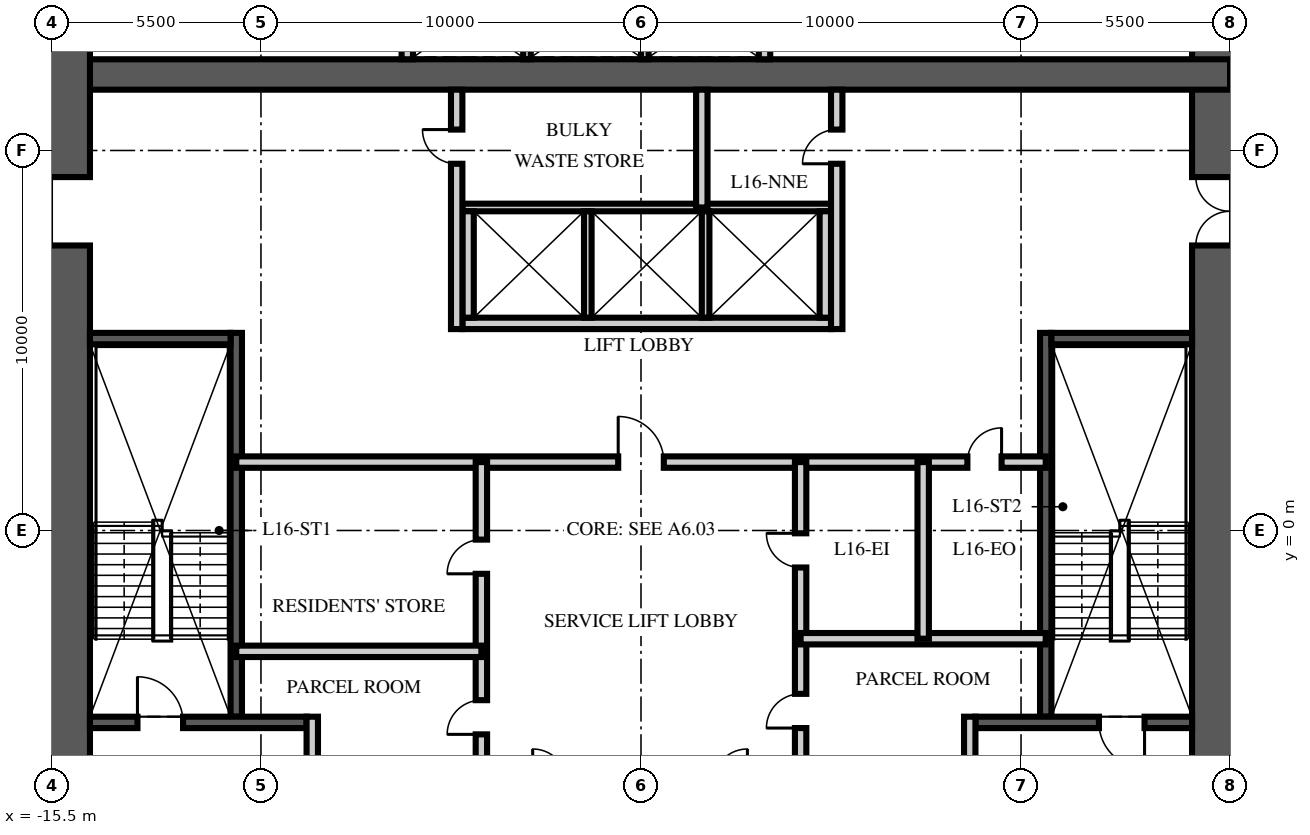
"""IFC4 building model, lengths in metres.
Left out: names, types, materials, properties, quantities, classifications, styles, units other than length and angle.
Written with IfcOpenShell. Run it as: python <this file> out.ifc"""

import sys

from ifc_helpers import new_model, si_unit, direction, frame, frame_2d, origin, place, context, subcontext, project, spatial, rectangle, extrude, element, fill, save


model = new_model("IFC4")
c1 = context("Model", 3, precision=1e-05, world=origin(), true_north=direction((0.0, 1.0)))
c2 = subcontext(c1, "Body", "Model", "MODEL_VIEW")
j1 = project(units=[si_unit("LENGTHUNIT", "METRE"), si_unit("PLANEANGLEUNIT", "RADIAN")], contexts=[c1])
p1 = place(None, origin())
s1 = spatial("IfcSite", under=j1, at=p1, CompositionType="ELEMENT")
p2 = place(p1, origin())
s2 = spatial("IfcBuilding", under=s1, at=p2, CompositionType="ELEMENT")
p3 = place(p2, frame((0.0, 0.0, 66.0)))
s3 = spatial("IfcBuildingStorey", under=s2, at=p3, CompositionType="ELEMENT", Elevation=66.0)
p4 = place(p3, frame((15.5, -15.5, -0.25), z_axis=(0.0, 0.0, 1.0), x_axis=(0.0, 1.0, 0.0)))
e1 = element("IfcWall", 1, at=p4, inside=s3, PredefinedType="SHEAR", context=c2, shape_type="SweptSolid", body=[
    extrude(rectangle(XDim=31.0, YDim=2.0, at=frame_2d((15.5, 0.0))), origin(), (0.0, 0.0, 1.0), 3.75),
])
p5 = place(p4, frame((6.5, 0.0, 0.25)))
e2 = element("IfcOpeningElement", 2, at=p5, cuts=e1, PredefinedType="OPENING", context=c2, shape_type="SweptSolid", body=[
    extrude(rectangle(XDim=1.2, YDim=2.1, at=frame_2d((0.6, 1.05))), frame((0.0, 1.01, 0.0), z_axis=(0.0, -1.0, 0.0), x_axis=(1.0, 0.0, 0.0)), (0.0, 0.0, 1.0), 2.02),
])
p6 = place(p4, frame((23.0, 0.0, 0.25)))
e3 = element("IfcOpeningElement", 3, at=p6, cuts=e1, PredefinedType="OPENING", context=c2, shape_type="SweptSolid", body=[
    extrude(rectangle(XDim=1.8, YDim=2.1, at=frame_2d((0.9, 1.05))), frame((0.0, 1.01, 0.0), z_axis=(0.0, -1.0, 0.0), x_axis=(1.0, 0.0, 0.0)), (0.0, 0.0, 1.0), 2.02),
])
p7 = place(p3, frame((-15.5, 12.0, -0.25), z_axis=(0.0, 0.0, 1.0), x_axis=(1.0, 0.0, 0.0)))
e4 = element("IfcWall", 4, at=p7, inside=s3, PredefinedType="SHEAR", context=c2, shape_type="SweptSolid", body=[
    extrude(rectangle(XDim=31.0, YDim=0.8, at=frame_2d((15.5, 0.0))), origin(), (0.0, 0.0, 1.0), 3.75),
])
p8 = place(p3, frame((-15.5, -15.5, -0.25), z_axis=(0.0, 0.0, 1.0), x_axis=(0.0, 1.0, 0.0)))
e5 = element("IfcWall", 5, at=p8, inside=s3, PredefinedType="SHEAR", context=c2, shape_type="SweptSolid", body=[
    extrude(rectangle(XDim=31.0, YDim=2.0, at=frame_2d((15.5, 0.0))), origin(), (0.0, 0.0, 1.0), 3.75),
])
p9 = place(p8, frame((6.5, 0.0, 0.25)))
e6 = element("IfcOpeningElement", 6, at=p9, cuts=e5, PredefinedType="OPENING", context=c2, shape_type="SweptSolid", body=[
    extrude(rectangle(XDim=1.2, YDim=2.1, at=frame_2d((0.6, 1.05))), frame((0.0, 1.01, 0.0), z_axis=(0.0, -1.0, 0.0), x_axis=(1.0, 0.0, 0.0)), (0.0, 0.0, 1.0), 2.02),
])
p10 = place(p8, frame((23.0, 0.0, 0.25)))
e7 = element("IfcOpeningElement", 7, at=p10, cuts=e5, PredefinedType="OPENING", context=c2, shape_type="SweptSolid", body=[
    extrude(rectangle(XDim=1.8, YDim=2.1, at=frame_2d((0.9, 1.05))), frame((0.0, 1.01, 0.0), z_axis=(0.0, -1.0, 0.0), x_axis=(1.0, 0.0, 0.0)), (0.0, 0.0, 1.0), 2.02),
])
p11 = place(p3, frame((-10.65, -4.9, 0.0), z_axis=(0.0, 0.0, 1.0), x_axis=(0.0, 1.0, 0.0)))
e8 = element("IfcWall", 8, at=p11, inside=s3, PredefinedType="SOLIDWALL", context=c2, shape_type="SweptSolid", body=[
    extrude(rectangle(XDim=10.1, YDim=0.3, at=frame_2d((5.05, 0.0))), origin(), (0.0, 0.0, 1.0), 3.5),
])
p12 = place(p3, frame((-14.5, -5.05, 0.0), z_axis=(0.0, 0.0, 1.0), x_axis=(1.0, 0.0, 0.0)))
e9 = element("IfcWall", 9, at=p12, inside=s3, PredefinedType="SOLIDWALL", context=c2, shape_type="SweptSolid", body=[
    extrude(rectangle(XDim=5.7, YDim=0.3, at=frame_2d((2.85, 0.0))), origin(), (0.0, 0.0, 1.0), 3.5),
])
p13 = place(p12, frame((1.25, 0.0, 0.0)))
e10 = element("IfcOpeningElement", 10, at=p13, cuts=e9, PredefinedType="OPENING", context=c2, shape_type="SweptSolid", body=[
    extrude(rectangle(XDim=1.2, YDim=2.1, at=frame_2d((0.6, 1.05))), frame((0.0, 0.16, 0.0), z_axis=(0.0, -1.0, 0.0), x_axis=(1.0, 0.0, 0.0)), (0.0, 0.0, 1.0), 0.32),
])
p14 = place(p3, frame((-14.5, 5.05, 0.0), z_axis=(0.0, 0.0, 1.0), x_axis=(1.0, 0.0, 0.0)))
e11 = element("IfcWall", 11, at=p14, inside=s3, PredefinedType="SOLIDWALL", context=c2, shape_type="SweptSolid", body=[
    extrude(rectangle(XDim=3.7, YDim=0.3, at=frame_2d((1.85, 0.0))), origin(), (0.0, 0.0, 1.0), 3.5),
])
p15 = place(p3, frame((-8.65, -11.6, 0.0), z_axis=(0.0, 0.0, 1.0), x_axis=(0.0, 1.0, 0.0)))
e12 = element("IfcWall", 12, at=p15, inside=s3, PredefinedType="PARTITIONING", context=c2, shape_type="SweptSolid", body=[
    extrude(rectangle(XDim=6.7, YDim=0.3, at=frame_2d((3.35, 0.0))), origin(), (0.0, 0.0, 1.0), 3.5),
])
p16 = place(p15, frame((2.85, 0.0, 0.0)))
e13 = element("IfcOpeningElement", 13, at=p16, cuts=e12, PredefinedType="OPENING", context=c2, shape_type="SweptSolid", body=[
    extrude(rectangle(XDim=1.1, YDim=2.1, at=frame_2d((0.55, 1.05))), frame((0.0, 0.16, 0.0), z_axis=(0.0, -1.0, 0.0), x_axis=(1.0, 0.0, 0.0)), (0.0, 0.0, 1.0), 0.32),
])
p17 = place(p3, frame((10.65, -4.9, 0.0), z_axis=(0.0, 0.0, 1.0), x_axis=(0.0, 1.0, 0.0)))
e14 = element("IfcWall", 14, at=p17, inside=s3, PredefinedType="SOLIDWALL", context=c2, shape_type="SweptSolid", body=[
    extrude(rectangle(XDim=10.1, YDim=0.3, at=frame_2d((5.05, 0.0))), origin(), (0.0, 0.0, 1.0), 3.5),
])
p18 = place(p3, frame((14.5, -5.05, 0.0), z_axis=(0.0, 0.0, 1.0), x_axis=(-1.0, 0.0, 0.0)))
e15 = element("IfcWall", 15, at=p18, inside=s3, PredefinedType="SOLIDWALL", context=c2, shape_type="SweptSolid", body=[
    extrude(rectangle(XDim=5.7, YDim=0.3, at=frame_2d((2.85, 0.0))), origin(), (0.0, 0.0, 1.0), 3.5),
])
p19 = place(p18, frame((1.25, 0.0, 0.0)))
e16 = element("IfcOpeningElement", 16, at=p19, cuts=e15, PredefinedType="OPENING", context=c2, shape_type="SweptSolid", body=[
    extrude(rectangle(XDim=1.2, YDim=2.1, at=frame_2d((0.6, 1.05))), frame((0.0, 0.16, 0.0), z_axis=(0.0, -1.0, 0.0), x_axis=(1.0, 0.0, 0.0)), (0.0, 0.0, 1.0), 0.32),
])
p20 = place(p3, frame((14.5, 5.05, 0.0), z_axis=(0.0, 0.0, 1.0), x_axis=(-1.0, 0.0, 0.0)))
e17 = element("IfcWall", 17, at=p20, inside=s3, PredefinedType="SOLIDWALL", context=c2, shape_type="SweptSolid", body=[
    extrude(rectangle(XDim=3.7, YDim=0.3, at=frame_2d((1.85, 0.0))), origin(), (0.0, 0.0, 1.0), 3.5),
])
p21 = place(p3, frame((8.65, -11.6, 0.0), z_axis=(0.0, 0.0, 1.0), x_axis=(0.0, 1.0, 0.0)))
e18 = element("IfcWall", 18, at=p21, inside=s3, PredefinedType="PARTITIONING", context=c2, shape_type="SweptSolid", body=[
    extrude(rectangle(XDim=6.7, YDim=0.3, at=frame_2d((3.35, 0.0))), origin(), (0.0, 0.0, 1.0), 3.5),
])
p22 = place(p21, frame((2.85, 0.0, 0.0)))
e19 = element("IfcOpeningElement", 19, at=p22, cuts=e18, PredefinedType="OPENING", context=c2, shape_type="SweptSolid", body=[
    extrude(rectangle(XDim=1.1, YDim=2.1, at=frame_2d((0.55, 1.05))), frame((0.0, 0.16, 0.0), z_axis=(0.0, -1.0, 0.0), x_axis=(1.0, 0.0, 0.0)), (0.0, 0.0, 1.0), 0.32),
])
p23 = place(p3, frame((-4.7, 5.45, 0.0), z_axis=(0.0, 0.0, 1.0), x_axis=(1.0, 0.0, 0.0)))
e20 = element("IfcWall", 20, at=p23, inside=s3, PredefinedType="PARTITIONING", context=c2, shape_type="SweptSolid", body=[
    extrude(rectangle(XDim=9.7, YDim=0.3, at=frame_2d((4.85, 0.0))), origin(), (0.0, 0.0, 1.0), 3.5),
])
p24 = place(p3, frame((-4.7, 8.5, 0.0), z_axis=(0.0, 0.0, 1.0), x_axis=(1.0, 0.0, 0.0)))
e21 = element("IfcWall", 21, at=p24, inside=s3, PredefinedType="PARTITIONING", context=c2, shape_type="SweptSolid", body=[
    extrude(rectangle(XDim=9.7, YDim=0.2, at=frame_2d((4.85, 0.0))), origin(), (0.0, 0.0, 1.0), 3.5),
])
for number, where, z_axis, x_axis in (
    (22, (-4.55, 5.6, 0.0), (0.0, 0.0, 1.0), (0.0, 1.0, 0.0)),
    (23, (4.85, 5.6, 0.0), (0.0, 0.0, 1.0), (0.0, 1.0, 0.0)),
):
    element("IfcWall", number, at=place(p3, frame(where, z_axis=z_axis, x_axis=x_axis)), inside=s3, PredefinedType="PARTITIONING", context=c2, shape_type="SweptSolid", body=[
        extrude(rectangle(XDim=2.8, YDim=0.3, at=frame_2d((1.4, 0.0))), origin(), (0.0, 0.0, 1.0), 3.5),
    ])
for number, where, z_axis, x_axis in (
    (24, (-1.4, 5.6, 0.0), (0.0, 0.0, 1.0), (0.0, 1.0, 0.0)),
    (25, (1.7, 5.6, 0.0), (0.0, 0.0, 1.0), (0.0, 1.0, 0.0)),
):
    element("IfcWall", number, at=place(p3, frame(where, z_axis=z_axis, x_axis=x_axis)), inside=s3, PredefinedType="PARTITIONING", context=c2, shape_type="SweptSolid", body=[
        extrude(rectangle(XDim=2.8, YDim=0.2, at=frame_2d((1.4, 0.0))), origin(), (0.0, 0.0, 1.0), 3.5),
    ])
for number, where, z_axis, x_axis in (
    (26, (-6.15, 12.4, 0.0), (0.0, 0.0, 1.0), (0.0, 1.0, 0.0)),
    (27, (3.25, 12.4, 0.0), (0.0, 0.0, 1.0), (0.0, 1.0, 0.0)),
):
    element("IfcWall", number, at=place(p3, frame(where, z_axis=z_axis, x_axis=x_axis)), inside=s3, PredefinedType="PARTITIONING", context=c2, shape_type="SweptSolid", body=[
        extrude(rectangle(XDim=2.1, YDim=0.3, at=frame_2d((1.05, 0.0))), origin(), (0.0, 0.0, 1.0), 3.5),
    ])
for number, where, z_axis, x_axis in (
    (28, (-3.0, 12.4, 0.0), (0.0, 0.0, 1.0), (0.0, 1.0, 0.0)),
    (29, (0.1, 12.4, 0.0), (0.0, 0.0, 1.0), (0.0, 1.0, 0.0)),
):
    element("IfcWall", number, at=place(p3, frame(where, z_axis=z_axis, x_axis=x_axis)), inside=s3, PredefinedType="PARTITIONING", context=c2, shape_type="SweptSolid", body=[
        extrude(rectangle(XDim=2.1, YDim=0.2, at=frame_2d((1.05, 0.0))), origin(), (0.0, 0.0, 1.0), 3.5),
    ])
p25 = place(p3, frame((-10.65, 1.8, 0.0), z_axis=(0.0, 0.0, 1.0), x_axis=(1.0, 0.0, 0.0)))
e30 = element("IfcWall", 30, at=p25, inside=s3, PredefinedType="PARTITIONING", context=c2, shape_type="SweptSolid", body=[
    extrude(rectangle(XDim=21.3, YDim=0.3, at=frame_2d((10.65, 0.0))), origin(), (0.0, 0.0, 1.0), 3.5),
])
p26 = place(p25, frame((10.05, 0.0, 0.0)))
e31 = element("IfcOpeningElement", 31, at=p26, cuts=e30, PredefinedType="OPENING", context=c2, shape_type="SweptSolid", body=[
    extrude(rectangle(XDim=1.2, YDim=2.1, at=frame_2d((0.6, 1.05))), frame((0.0, 0.16, 0.0), z_axis=(0.0, -1.0, 0.0), x_axis=(1.0, 0.0, 0.0)), (0.0, 0.0, 1.0), 0.32),
])
p27 = place(p25, frame((19.238, 0.0, 0.0)))
e32 = element("IfcOpeningElement", 32, at=p27, cuts=e30, PredefinedType="OPENING", context=c2, shape_type="SweptSolid", body=[
    extrude(rectangle(XDim=0.9, YDim=2.1, at=frame_2d((0.45, 1.05))), frame((0.0, 0.16, 0.0), z_axis=(0.0, -1.0, 0.0), x_axis=(1.0, 0.0, 0.0)), (0.0, 0.0, 1.0), 0.32),
])
p28 = place(p3, frame((-4.2, -6.65, 0.0), z_axis=(0.0, 0.0, 1.0), x_axis=(0.0, 1.0, 0.0)))
e33 = element("IfcWall", 33, at=p28, inside=s3, PredefinedType="PARTITIONING", context=c2, shape_type="SweptSolid", body=[
    extrude(rectangle(XDim=8.45, YDim=0.3, at=frame_2d((4.225, 0.0))), origin(), (0.0, 0.0, 1.0), 3.5),
])
p29 = place(p28, frame((1.285, 0.0, 0.0)))
e34 = element("IfcOpeningElement", 34, at=p29, cuts=e33, PredefinedType="OPENING", context=c2, shape_type="SweptSolid", body=[
    extrude(rectangle(XDim=0.9, YDim=2.1, at=frame_2d((0.45, 1.05))), frame((0.0, 0.16, 0.0), z_axis=(0.0, -1.0, 0.0), x_axis=(1.0, 0.0, 0.0)), (0.0, 0.0, 1.0), 0.32),
])
p30 = place(p28, frame((5.51, 0.0, 0.0)))
e35 = element("IfcOpeningElement", 35, at=p30, cuts=e33, PredefinedType="OPENING", context=c2, shape_type="SweptSolid", body=[
    extrude(rectangle(XDim=0.9, YDim=2.1, at=frame_2d((0.45, 1.05))), frame((0.0, 0.16, 0.0), z_axis=(0.0, -1.0, 0.0), x_axis=(1.0, 0.0, 0.0)), (0.0, 0.0, 1.0), 0.32),
])
p31 = place(p3, frame((4.2, -6.65, 0.0), z_axis=(0.0, 0.0, 1.0), x_axis=(0.0, 1.0, 0.0)))
e36 = element("IfcWall", 36, at=p31, inside=s3, PredefinedType="PARTITIONING", context=c2, shape_type="SweptSolid", body=[
    extrude(rectangle(XDim=8.45, YDim=0.3, at=frame_2d((4.225, 0.0))), origin(), (0.0, 0.0, 1.0), 3.5),
])
p32 = place(p31, frame((1.451, 0.0, 0.0)))
e37 = element("IfcOpeningElement", 37, at=p32, cuts=e36, PredefinedType="OPENING", context=c2, shape_type="SweptSolid", body=[
    extrude(rectangle(XDim=0.9, YDim=2.1, at=frame_2d((0.45, 1.05))), frame((0.0, 0.16, 0.0), z_axis=(0.0, -1.0, 0.0), x_axis=(1.0, 0.0, 0.0)), (0.0, 0.0, 1.0), 0.32),
])
p33 = place(p31, frame((5.676, 0.0, 0.0)))
e38 = element("IfcOpeningElement", 38, at=p33, cuts=e36, PredefinedType="OPENING", context=c2, shape_type="SweptSolid", body=[
    extrude(rectangle(XDim=0.9, YDim=2.1, at=frame_2d((0.45, 1.05))), frame((0.0, 0.16, 0.0), z_axis=(0.0, -1.0, 0.0), x_axis=(1.0, 0.0, 0.0)), (0.0, 0.0, 1.0), 0.32),
])
for number, where, z_axis, x_axis in (
    (39, (-10.65, -3.18, 0.0), (0.0, 0.0, 1.0), (1.0, 0.0, 0.0)),
    (40, (10.65, -2.848, 0.0), (0.0, 0.0, 1.0), (-1.0, 0.0, 0.0)),
):
    element("IfcWall", number, at=place(p3, frame(where, z_axis=z_axis, x_axis=x_axis)), inside=s3, PredefinedType="PARTITIONING", context=c2, shape_type="SweptSolid", body=[
        extrude(rectangle(XDim=6.45, YDim=0.3, at=frame_2d((3.225, 0.0))), origin(), (0.0, 0.0, 1.0), 3.5),
    ])
p34 = place(p3, frame((7.425, -2.848, 0.0), z_axis=(0.0, 0.0, 1.0), x_axis=(0.0, 1.0, 0.0)))
e41 = element("IfcWall", 41, at=p34, inside=s3, PredefinedType="PARTITIONING", context=c2, shape_type="SweptSolid", body=[
    extrude(rectangle(XDim=4.648, YDim=0.3, at=frame_2d((2.324, 0.0))), origin(), (0.0, 0.0, 1.0), 3.5),
])
p35 = place(p3, frame((-4.85, 5.3, 0.0), z_axis=(0.0, 0.0, 1.0), x_axis=(0.0, 1.0, 0.0)))
e42 = element("IfcWall", 42, at=p35, inside=s3, PredefinedType="PARTITIONING", context=c2, shape_type="SweptSolid", body=[
    extrude(rectangle(XDim=6.3, YDim=0.3, at=frame_2d((3.15, 0.0))), origin(), (0.0, 0.0, 1.0), 3.5),
])
p36 = place(p35, frame((4.35, 0.0, 0.0)))
e43 = element("IfcOpeningElement", 43, at=p36, cuts=e42, PredefinedType="OPENING", context=c2, shape_type="SweptSolid", body=[
    extrude(rectangle(XDim=0.9, YDim=2.1, at=frame_2d((0.45, 1.05))), frame((0.0, 0.16, 0.0), z_axis=(0.0, -1.0, 0.0), x_axis=(1.0, 0.0, 0.0)), (0.0, 0.0, 1.0), 0.32),
])
p37 = place(p3, frame((5.15, 5.3, 0.0), z_axis=(0.0, 0.0, 1.0), x_axis=(0.0, 1.0, 0.0)))
e44 = element("IfcWall", 44, at=p37, inside=s3, PredefinedType="PARTITIONING", context=c2, shape_type="SweptSolid", body=[
    extrude(rectangle(XDim=6.3, YDim=0.3, at=frame_2d((3.15, 0.0))), origin(), (0.0, 0.0, 1.0), 3.5),
])
p38 = place(p37, frame((4.35, 0.0, 0.0)))
e45 = element("IfcOpeningElement", 45, at=p38, cuts=e44, PredefinedType="OPENING", context=c2, shape_type="SweptSolid", body=[
    extrude(rectangle(XDim=0.9, YDim=2.1, at=frame_2d((0.45, 1.05))), frame((0.0, 0.16, 0.0), z_axis=(0.0, -1.0, 0.0), x_axis=(1.0, 0.0, 0.0)), (0.0, 0.0, 1.0), 0.32),
])
p39 = place(p3, frame((1.6, 8.5, 0.0), z_axis=(0.0, 0.0, 1.0), x_axis=(0.0, 1.0, 0.0)))
e46 = element("IfcWall", 46, at=p39, inside=s3, PredefinedType="PARTITIONING", context=c2, shape_type="SweptSolid", body=[
    extrude(rectangle(XDim=3.1, YDim=0.3, at=frame_2d((1.55, 0.0))), origin(), (0.0, 0.0, 1.0), 3.5),
])
p40 = place(p13, origin())
e47 = element("IfcDoor", 47, at=p40, inside=s3, OperationType="SINGLE_SWING_LEFT", PredefinedType="DOOR", context=c2, shape_type="SweptSolid", body=[
    extrude(rectangle(XDim=1.2, YDim=2.1, at=frame_2d((0.6, 1.05))), frame((0.0, 0.025, 0.0), z_axis=(0.0, -1.0, 0.0), x_axis=(1.0, 0.0, 0.0)), (0.0, 0.0, 1.0), 0.05),
])
fill(e10, e47)
p41 = place(p10, origin())
e48 = element("IfcDoor", 48, at=p41, inside=s3, OperationType="DOUBLE_DOOR_SINGLE_SWING", PredefinedType="DOOR", context=c2, shape_type="SweptSolid", body=[
    extrude(rectangle(XDim=1.8, YDim=2.1, at=frame_2d((0.9, 1.05))), frame((0.0, 0.025, 0.0), z_axis=(0.0, -1.0, 0.0), x_axis=(1.0, 0.0, 0.0)), (0.0, 0.0, 1.0), 0.05),
])
fill(e7, e48)
p42 = place(p19, origin())
e49 = element("IfcDoor", 49, at=p42, inside=s3, OperationType="SINGLE_SWING_LEFT", PredefinedType="DOOR", context=c2, shape_type="SweptSolid", body=[
    extrude(rectangle(XDim=1.2, YDim=2.1, at=frame_2d((0.6, 1.05))), frame((0.0, 0.025, 0.0), z_axis=(0.0, -1.0, 0.0), x_axis=(1.0, 0.0, 0.0)), (0.0, 0.0, 1.0), 0.05),
])
fill(e16, e49)
p43 = place(p6, origin())
e50 = element("IfcDoor", 50, at=p43, inside=s3, OperationType="DOUBLE_DOOR_SINGLE_SWING", PredefinedType="DOOR", context=c2, shape_type="SweptSolid", body=[
    extrude(rectangle(XDim=1.8, YDim=2.1, at=frame_2d((0.9, 1.05))), frame((0.0, 0.025, 0.0), z_axis=(0.0, -1.0, 0.0), x_axis=(1.0, 0.0, 0.0)), (0.0, 0.0, 1.0), 0.05),
])
fill(e3, e50)
p44 = place(p26, origin())
e51 = element("IfcDoor", 51, at=p44, inside=s3, OperationType="SINGLE_SWING_LEFT", PredefinedType="DOOR", context=c2, shape_type="SweptSolid", body=[
    extrude(rectangle(XDim=1.2, YDim=2.1, at=frame_2d((0.6, 1.05))), frame((0.0, 0.025, 0.0), z_axis=(0.0, -1.0, 0.0), x_axis=(1.0, 0.0, 0.0)), (0.0, 0.0, 1.0), 0.05),
])
fill(e31, e51)
p45 = place(p29, origin())
e52 = element("IfcDoor", 52, at=p45, inside=s3, OperationType="SINGLE_SWING_LEFT", PredefinedType="DOOR", context=c2, shape_type="SweptSolid", body=[
    extrude(rectangle(XDim=0.9, YDim=2.1, at=frame_2d((0.45, 1.05))), frame((0.0, 0.025, 0.0), z_axis=(0.0, -1.0, 0.0), x_axis=(1.0, 0.0, 0.0)), (0.0, 0.0, 1.0), 0.05),
])
fill(e34, e52)
p46 = place(p30, origin())
e53 = element("IfcDoor", 53, at=p46, inside=s3, OperationType="SINGLE_SWING_LEFT", PredefinedType="DOOR", context=c2, shape_type="SweptSolid", body=[
    extrude(rectangle(XDim=0.9, YDim=2.1, at=frame_2d((0.45, 1.05))), frame((0.0, 0.025, 0.0), z_axis=(0.0, -1.0, 0.0), x_axis=(1.0, 0.0, 0.0)), (0.0, 0.0, 1.0), 0.05),
])
fill(e35, e53)
p47 = place(p32, origin())
e54 = element("IfcDoor", 54, at=p47, inside=s3, OperationType="SINGLE_SWING_LEFT", PredefinedType="DOOR", context=c2, shape_type="SweptSolid", body=[
    extrude(rectangle(XDim=0.9, YDim=2.1, at=frame_2d((0.45, 1.05))), frame((0.0, 0.025, 0.0), z_axis=(0.0, -1.0, 0.0), x_axis=(1.0, 0.0, 0.0)), (0.0, 0.0, 1.0), 0.05),
])
fill(e37, e54)
p48 = place(p33, origin())
e55 = element("IfcDoor", 55, at=p48, inside=s3, OperationType="SINGLE_SWING_RIGHT", PredefinedType="DOOR", context=c2, shape_type="SweptSolid", body=[
    extrude(rectangle(XDim=0.9, YDim=2.1, at=frame_2d((0.45, 1.05))), frame((0.0, 0.025, 0.0), z_axis=(0.0, -1.0, 0.0), x_axis=(1.0, 0.0, 0.0)), (0.0, 0.0, 1.0), 0.05),
])
fill(e38, e55)
p49 = place(p27, origin())
e56 = element("IfcDoor", 56, at=p49, inside=s3, OperationType="SINGLE_SWING_RIGHT", PredefinedType="DOOR", context=c2, shape_type="SweptSolid", body=[
    extrude(rectangle(XDim=0.9, YDim=2.1, at=frame_2d((0.45, 1.05))), frame((0.0, 0.025, 0.0), z_axis=(0.0, -1.0, 0.0), x_axis=(1.0, 0.0, 0.0)), (0.0, 0.0, 1.0), 0.05),
])
fill(e32, e56)
p50 = place(p36, origin())
e57 = element("IfcDoor", 57, at=p50, inside=s3, OperationType="SINGLE_SWING_RIGHT", PredefinedType="DOOR", context=c2, shape_type="SweptSolid", body=[
    extrude(rectangle(XDim=0.9, YDim=2.1, at=frame_2d((0.45, 1.05))), frame((0.0, 0.025, 0.0), z_axis=(0.0, -1.0, 0.0), x_axis=(1.0, 0.0, 0.0)), (0.0, 0.0, 1.0), 0.05),
])
fill(e43, e57)
p51 = place(p38, origin())
e58 = element("IfcDoor", 58, at=p51, inside=s3, OperationType="SINGLE_SWING_LEFT", PredefinedType="DOOR", context=c2, shape_type="SweptSolid", body=[
    extrude(rectangle(XDim=0.9, YDim=2.1, at=frame_2d((0.45, 1.05))), frame((0.0, 0.025, 0.0), z_axis=(0.0, -1.0, 0.0), x_axis=(1.0, 0.0, 0.0)), (0.0, 0.0, 1.0), 0.05),
])
fill(e45, e58)
save(model, sys.argv[1])
